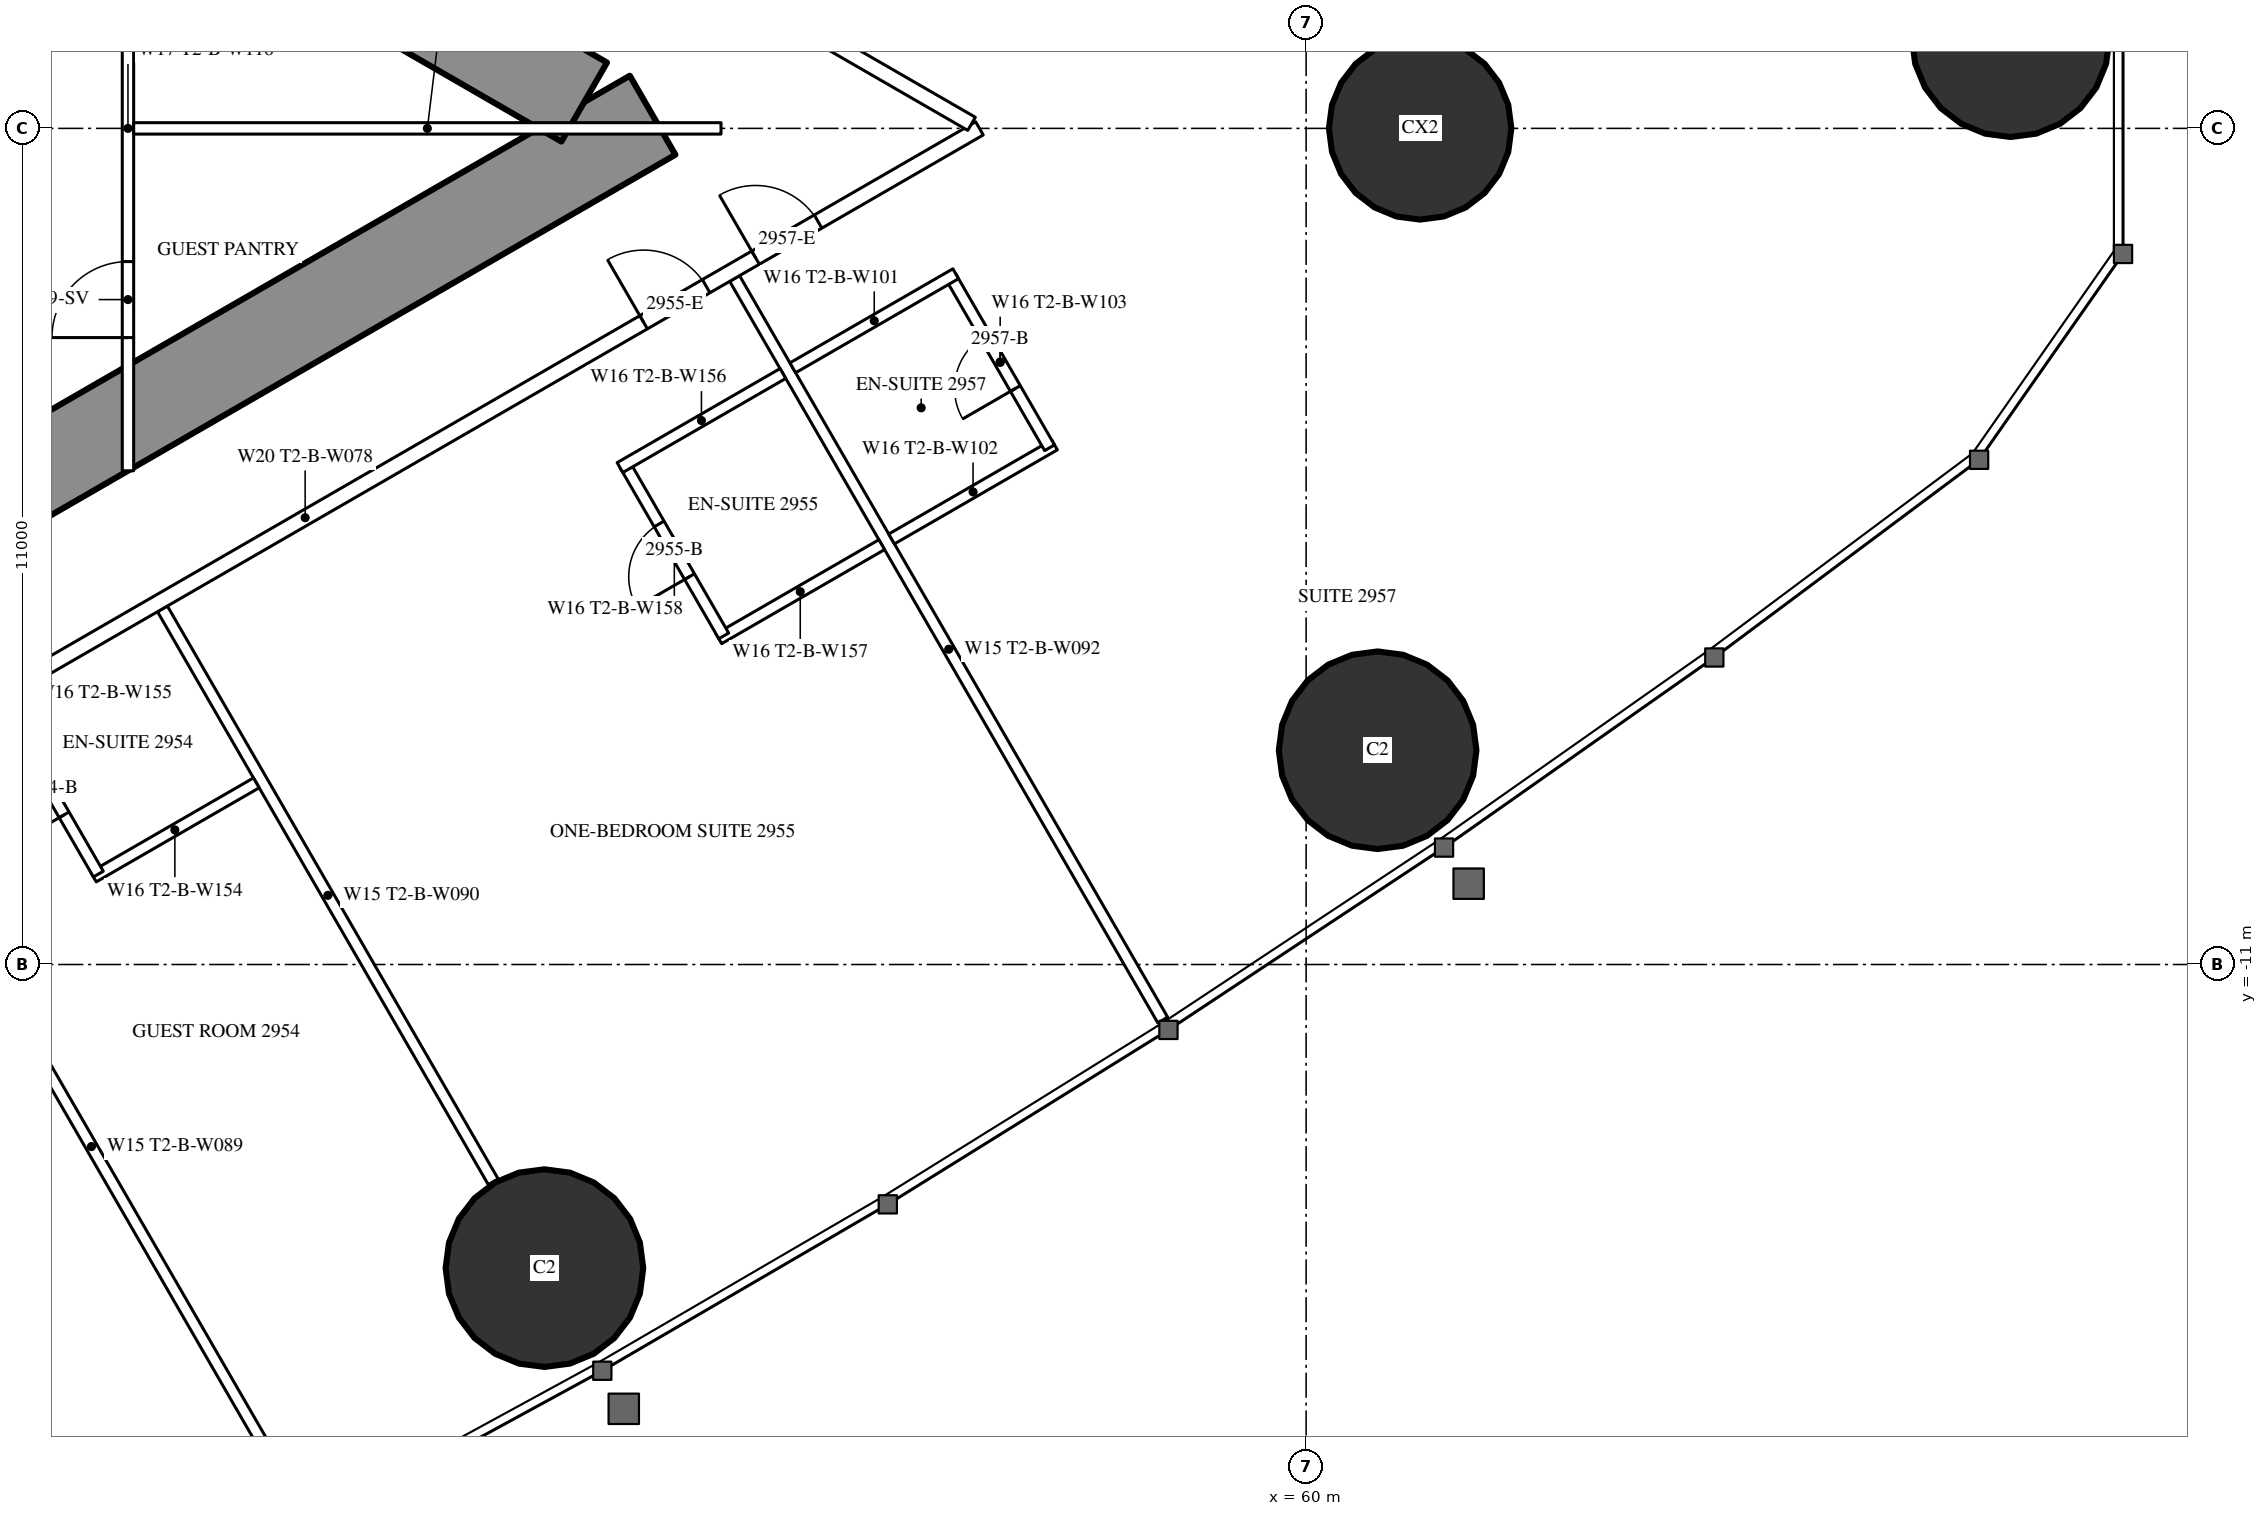
"""IFC4 building model, lengths in metres.
Left out: names, types, materials, properties, quantities, classifications, styles, units other than length and angle.
Written with IfcOpenShell. Run it as: python <this file> out.ifc"""

import sys

from ifc_helpers import new_model, si_unit, direction, frame, frame_2d, origin, origin_2d, place, context, subcontext, project, spatial, rectangle, circle, hollow_circle, extrude, element, fill, save


model = new_model("IFC4")
c1 = context("Model", 3, precision=1e-05, world=origin(), true_north=direction((0.0, 1.0)))
c2 = subcontext(c1, "Body", "Model", "MODEL_VIEW")
j1 = project(units=[si_unit("LENGTHUNIT", "METRE"), si_unit("PLANEANGLEUNIT", "RADIAN")], contexts=[c1])
p1 = place(None, origin())
s1 = spatial("IfcSite", under=j1, at=p1, CompositionType="ELEMENT")
p2 = place(p1, origin())
s2 = spatial("IfcBuilding", under=s1, at=p2, CompositionType="ELEMENT")
p3 = place(p2, frame((0.0, 0.0, 111.6)))
s3 = spatial("IfcBuildingStorey", under=s2, at=p3, CompositionType="ELEMENT", Elevation=111.6)
for number, where, z_axis, x_axis in (
    (1, (69.269, 1.187, 0.0), (0.0, 0.0, 1.0), (1.0, 0.0, 0.0)),
    (2, (49.979, -14.994, 0.0), (0.0, 0.0, 1.0), (1.0, 0.0, 0.0)),
    (3, (60.941, -8.181, 0.0), (0.0, 0.0, 1.0), (1.0, 0.0, 0.0)),
):
    element("IfcColumn", number, at=place(p3, frame(where, z_axis=z_axis, x_axis=x_axis)), inside=s3, PredefinedType="COLUMN", context=c2, shape_type="SweptSolid", body=[
        extrude(hollow_circle(Radius=1.3, WallThickness=0.1, at=origin_2d()), origin(), (0.0, 0.0, 1.0), 3.5),
    ])
p4 = place(p3, frame((61.5, 0.0, 0.0), z_axis=(0.0, 0.0, 1.0), x_axis=(1.0, 0.0, 0.0)))
e4 = element("IfcColumn", 4, at=p4, inside=s3, PredefinedType="COLUMN", context=c2, shape_type="SweptSolid", body=[
    extrude(circle(Radius=1.2, at=origin_2d()), origin(), (0.0, 0.0, 1.0), 3.5),
])
p5 = place(p3, frame((27.2, -13.8, 0.0), z_axis=(0.0, 0.0, 1.0), x_axis=(0.866027159892, 0.499996958321, 0.0)))
e5 = element("IfcWall", 5, at=p5, inside=s3, PredefinedType="SHEAR", context=c2, shape_type="SweptSolid", body=[
    extrude(rectangle(XDim=27.947, YDim=1.2, at=frame_2d((13.973, 0.0))), origin(), (0.0, 0.0, 1.0), 3.5),
])
p6 = place(p5, frame((4.6, 0.0, 0.0)))
e6 = element("IfcOpeningElement", 6, at=p6, cuts=e5, PredefinedType="OPENING", context=c2, shape_type="SweptSolid", body=[
    extrude(rectangle(XDim=1.0, YDim=2.2, at=frame_2d((0.5, 1.1))), frame((0.0, 0.61, 0.0), z_axis=(0.0, -1.0, 0.0), x_axis=(1.0, 0.0, 0.0)), (0.0, 0.0, 1.0), 1.22),
])
p7 = place(p5, frame((13.395, 0.0, 0.0)))
e7 = element("IfcOpeningElement", 7, at=p7, cuts=e5, PredefinedType="OPENING", context=c2, shape_type="SweptSolid", body=[
    extrude(rectangle(XDim=1.8, YDim=2.2, at=frame_2d((0.9, 1.1))), frame((0.0, 0.61, 0.0), z_axis=(0.0, -1.0, 0.0), x_axis=(1.0, 0.0, 0.0)), (0.0, 0.0, 1.0), 1.22),
])
p8 = place(p3, frame((27.2, 13.8, 0.0), z_axis=(0.0, 0.0, 1.0), x_axis=(0.866024515034, -0.500001539357, 0.0)))
e8 = element("IfcWall", 8, at=p8, inside=s3, PredefinedType="SHEAR", context=c2, shape_type="SweptSolid", body=[
    extrude(rectangle(XDim=26.907, YDim=1.2, at=frame_2d((13.454, 0.0))), origin(), (0.0, 0.0, 1.0), 3.5),
])
p9 = place(p8, frame((4.6, 0.0, 0.0)))
e9 = element("IfcOpeningElement", 9, at=p9, cuts=e8, PredefinedType="OPENING", context=c2, shape_type="SweptSolid", body=[
    extrude(rectangle(XDim=1.0, YDim=2.2, at=frame_2d((0.5, 1.1))), frame((0.0, 0.61, 0.0), z_axis=(0.0, -1.0, 0.0), x_axis=(1.0, 0.0, 0.0)), (0.0, 0.0, 1.0), 1.22),
])
p10 = place(p8, frame((13.395, 0.0, 0.0)))
e10 = element("IfcOpeningElement", 10, at=p10, cuts=e8, PredefinedType="OPENING", context=c2, shape_type="SweptSolid", body=[
    extrude(rectangle(XDim=1.8, YDim=2.2, at=frame_2d((0.9, 1.1))), frame((0.0, 0.61, 0.0), z_axis=(0.0, -1.0, 0.0), x_axis=(1.0, 0.0, 0.0)), (0.0, 0.0, 1.0), 1.22),
])
p11 = place(p3, frame((41.19, -8.494, 0.0), z_axis=(0.0, 0.0, 1.0), x_axis=(0.49999258054, -0.866029687369, 0.0)))
e11 = element("IfcWall", 11, at=p11, inside=s3, PredefinedType="PARTITIONING", context=c2, shape_type="SweptSolid", body=[
    extrude(rectangle(XDim=11.318, YDim=0.15, at=frame_2d((5.659, 0.0))), origin(), (0.0, 0.0, 1.0), 3.25),
])
p12 = place(p3, frame((44.954, -6.321, 0.0), z_axis=(0.0, 0.0, 1.0), x_axis=(0.500018676722, -0.866014620505, 0.0)))
e12 = element("IfcWall", 12, at=p12, inside=s3, PredefinedType="PARTITIONING", context=c2, shape_type="SweptSolid", body=[
    extrude(rectangle(XDim=8.704, YDim=0.15, at=frame_2d((4.352, 0.0))), origin(), (0.0, 0.0, 1.0), 2.2),
])
p13 = place(p3, frame((52.481, -1.975, 0.0), z_axis=(0.0, 0.0, 1.0), x_axis=(0.500003867771, -0.866023170714, 0.0)))
e13 = element("IfcWall", 13, at=p13, inside=s3, PredefinedType="PARTITIONING", context=c2, shape_type="SweptSolid", body=[
    extrude(rectangle(XDim=11.265, YDim=0.15, at=frame_2d((5.632, 0.0))), origin(), (0.0, 0.0, 1.0), 3.25),
])
p14 = place(p3, frame((37.96, -10.243, 0.0), z_axis=(0.0, 0.0, 1.0), x_axis=(0.866026429433, 0.499998223521, 0.0)))
e14 = element("IfcWall", 14, at=p14, inside=s3, PredefinedType="PARTITIONING", context=c2, shape_type="SweptSolid", body=[
    extrude(rectangle(XDim=20.487, YDim=0.2, at=frame_2d((10.243, 0.0))), origin(), (0.0, 0.0, 1.0), 3.25),
])
p15 = place(p14, frame((4.343, 0.0, 0.0)))
e15 = element("IfcOpeningElement", 15, at=p15, cuts=e14, PredefinedType="OPENING", context=c2, shape_type="SweptSolid", body=[
    extrude(rectangle(XDim=0.95, YDim=2.2, at=frame_2d((0.475, 1.1))), frame((0.0, 0.11, 0.0), z_axis=(0.0, -1.0, 0.0), x_axis=(1.0, 0.0, 0.0)), (0.0, 0.0, 1.0), 0.22),
])
p16 = place(p14, frame((15.385, 0.0, 0.0)))
e16 = element("IfcOpeningElement", 16, at=p16, cuts=e14, PredefinedType="OPENING", context=c2, shape_type="SweptSolid", body=[
    extrude(rectangle(XDim=0.95, YDim=2.2, at=frame_2d((0.475, 1.1))), frame((0.0, 0.11, 0.0), z_axis=(0.0, -1.0, 0.0), x_axis=(1.0, 0.0, 0.0)), (0.0, 0.0, 1.0), 0.22),
])
p17 = place(p14, frame((17.085, 0.0, 0.0)))
e17 = element("IfcOpeningElement", 17, at=p17, cuts=e14, PredefinedType="OPENING", context=c2, shape_type="SweptSolid", body=[
    extrude(rectangle(XDim=0.95, YDim=2.2, at=frame_2d((0.475, 1.1))), frame((0.0, 0.11, 0.0), z_axis=(0.0, -1.0, 0.0), x_axis=(1.0, 0.0, 0.0)), (0.0, 0.0, 1.0), 0.22),
])
p18 = place(p14, frame((1.048, 0.0, 0.0)))
e18 = element("IfcOpeningElement", 18, at=p18, cuts=e14, PredefinedType="OPENING", context=c2, shape_type="SweptSolid", body=[
    extrude(rectangle(XDim=1.8, YDim=2.2, at=frame_2d((0.9, 1.1))), frame((0.0, 0.11, 0.0), z_axis=(0.0, -1.0, 0.0), x_axis=(1.0, 0.0, 0.0)), (0.0, 0.0, 1.0), 0.22),
])
p19 = place(p3, frame((44.925, 6.222, 0.0), z_axis=(0.0, 0.0, 1.0), x_axis=(0.866025590081, -0.499999677325, 0.0)))
e19 = element("IfcWall", 19, at=p19, inside=s3, PredefinedType="PARTITIONING", context=c2, shape_type="SweptSolid", body=[
    extrude(rectangle(XDim=12.324, YDim=0.2, at=frame_2d((6.162, 0.0))), origin(), (0.0, 0.0, 1.0), 3.25),
])
p20 = place(p19, frame((9.042, 0.0, 0.0)))
e20 = element("IfcOpeningElement", 20, at=p20, cuts=e19, PredefinedType="OPENING", context=c2, shape_type="SweptSolid", body=[
    extrude(rectangle(XDim=0.95, YDim=2.2, at=frame_2d((0.475, 1.1))), frame((0.0, 0.11, 0.0), z_axis=(0.0, -1.0, 0.0), x_axis=(1.0, 0.0, 0.0)), (0.0, 0.0, 1.0), 0.22),
])
p21 = place(p19, frame((7.342, 0.0, 0.0)))
e21 = element("IfcOpeningElement", 21, at=p21, cuts=e19, PredefinedType="OPENING", context=c2, shape_type="SweptSolid", body=[
    extrude(rectangle(XDim=0.95, YDim=2.2, at=frame_2d((0.475, 1.1))), frame((0.0, 0.11, 0.0), z_axis=(0.0, -1.0, 0.0), x_axis=(1.0, 0.0, 0.0)), (0.0, 0.0, 1.0), 0.22),
])
p22 = place(p19, frame((0.6, 0.0, 0.0)))
e22 = element("IfcOpeningElement", 22, at=p22, cuts=e19, PredefinedType="OPENING", context=c2, shape_type="SweptSolid", body=[
    extrude(rectangle(XDim=0.95, YDim=2.2, at=frame_2d((0.475, 1.1))), frame((0.0, 0.11, 0.0), z_axis=(0.0, -1.0, 0.0), x_axis=(1.0, 0.0, 0.0)), (0.0, 0.0, 1.0), 0.22),
])
p23 = place(p3, frame((44.045, -9.848, 0.0), z_axis=(0.0, 0.0, 1.0), x_axis=(0.866031185235, 0.4999899861, 0.0)))
e23 = element("IfcWall", 23, at=p23, inside=s3, PredefinedType="PARTITIONING", context=c2, shape_type="SweptSolid", body=[
    extrude(rectangle(XDim=2.475, YDim=0.15, at=frame_2d((1.238, 0.0))), origin(), (0.0, 0.0, 1.0), 3.25),
])
p24 = place(p3, frame((42.81, -7.559, 0.0), z_axis=(0.0, 0.0, 1.0), x_axis=(0.499936506574, -0.866062058628, 0.0)))
e24 = element("IfcWall", 24, at=p24, inside=s3, PredefinedType="PARTITIONING", context=c2, shape_type="SweptSolid", body=[
    extrude(rectangle(XDim=2.6, YDim=0.15, at=frame_2d((1.3, 0.0))), origin(), (0.0, 0.0, 1.0), 3.25),
])
p25 = place(p24, frame((0.9, 0.0, 0.0)))
e25 = element("IfcOpeningElement", 25, at=p25, cuts=e24, PredefinedType="OPENING", context=c2, shape_type="SweptSolid", body=[
    extrude(rectangle(XDim=0.8, YDim=2.2, at=frame_2d((0.4, 1.1))), frame((0.0, 0.085, 0.0), z_axis=(0.0, -1.0, 0.0), x_axis=(1.0, 0.0, 0.0)), (0.0, 0.0, 1.0), 0.17),
])
p26 = place(p3, frame((52.273, -6.714, 0.0), z_axis=(0.0, 0.0, 1.0), x_axis=(0.866031185235, 0.4999899861, 0.0)))
e26 = element("IfcWall", 26, at=p26, inside=s3, PredefinedType="PARTITIONING", context=c2, shape_type="SweptSolid", body=[
    extrude(rectangle(XDim=2.475, YDim=0.15, at=frame_2d((1.238, 0.0))), origin(), (0.0, 0.0, 1.0), 3.25),
])
p27 = place(p3, frame((51.038, -4.425, 0.0), z_axis=(0.0, 0.0, 1.0), x_axis=(0.49997716683, -0.86603858612, 0.0)))
e27 = element("IfcWall", 27, at=p27, inside=s3, PredefinedType="PARTITIONING", context=c2, shape_type="SweptSolid", body=[
    extrude(rectangle(XDim=2.6, YDim=0.15, at=frame_2d((1.3, 0.0))), origin(), (0.0, 0.0, 1.0), 3.25),
])
p28 = place(p27, frame((0.9, 0.0, 0.0)))
e28 = element("IfcOpeningElement", 28, at=p28, cuts=e27, PredefinedType="OPENING", context=c2, shape_type="SweptSolid", body=[
    extrude(rectangle(XDim=0.8, YDim=2.2, at=frame_2d((0.4, 1.1))), frame((0.0, 0.085, 0.0), z_axis=(0.0, -1.0, 0.0), x_axis=(1.0, 0.0, 0.0)), (0.0, 0.0, 1.0), 0.17),
])
p29 = place(p3, frame((50.973, -4.462, 0.0), z_axis=(0.0, 0.0, 1.0), x_axis=(0.866031185235, 0.4999899861, 0.0)))
e29 = element("IfcWall", 29, at=p29, inside=s3, PredefinedType="PARTITIONING", context=c2, shape_type="SweptSolid", body=[
    extrude(rectangle(XDim=2.475, YDim=0.15, at=frame_2d((1.238, 0.0))), origin(), (0.0, 0.0, 1.0), 3.25),
])
p30 = place(p3, frame((54.546, -5.402, 0.0), z_axis=(0.0, 0.0, 1.0), x_axis=(0.866006523861, 0.500032699561, 0.0)))
e30 = element("IfcWall", 30, at=p30, inside=s3, PredefinedType="PARTITIONING", context=c2, shape_type="SweptSolid", body=[
    extrude(rectangle(XDim=2.475, YDim=0.15, at=frame_2d((1.237, 0.0))), origin(), (0.0, 0.0, 1.0), 3.25),
])
p31 = place(p3, frame((55.325, -1.95, 0.0), z_axis=(0.0, 0.0, 1.0), x_axis=(0.500006934395, -0.866021400173, 0.0)))
e31 = element("IfcWall", 31, at=p31, inside=s3, PredefinedType="PARTITIONING", context=c2, shape_type="SweptSolid", body=[
    extrude(rectangle(XDim=2.6, YDim=0.15, at=frame_2d((1.3, 0.0))), origin(), (0.0, 0.0, 1.0), 3.25),
])
p32 = place(p31, frame((0.9, 0.0, 0.0)))
e32 = element("IfcOpeningElement", 32, at=p32, cuts=e31, PredefinedType="OPENING", context=c2, shape_type="SweptSolid", body=[
    extrude(rectangle(XDim=0.8, YDim=2.2, at=frame_2d((0.4, 1.1))), frame((0.0, 0.085, 0.0), z_axis=(0.0, -1.0, 0.0), x_axis=(1.0, 0.0, 0.0)), (0.0, 0.0, 1.0), 0.17),
])
p33 = place(p3, frame((53.246, -3.15, 0.0), z_axis=(0.0, 0.0, 1.0), x_axis=(0.866006523861, 0.500032699561, 0.0)))
e33 = element("IfcWall", 33, at=p33, inside=s3, PredefinedType="PARTITIONING", context=c2, shape_type="SweptSolid", body=[
    extrude(rectangle(XDim=2.475, YDim=0.15, at=frame_2d((1.237, 0.0))), origin(), (0.0, 0.0, 1.0), 3.25),
])
p34 = place(p3, frame((44.5, -4.505, 0.0), z_axis=(0.0, 0.0, 1.0), x_axis=(0.0, 1.0, 0.0)))
e34 = element("IfcWall", 34, at=p34, inside=s3, PredefinedType="PARTITIONING", context=c2, shape_type="SweptSolid", body=[
    extrude(rectangle(XDim=9.009, YDim=0.15, at=frame_2d((4.505, 0.0))), origin(), (0.0, 0.0, 1.0), 2.45),
])
p35 = place(p34, frame((1.752, 0.0, 0.0)))
e35 = element("IfcOpeningElement", 35, at=p35, cuts=e34, PredefinedType="OPENING", context=c2, shape_type="SweptSolid", body=[
    extrude(rectangle(XDim=1.0, YDim=2.2, at=frame_2d((0.5, 1.1))), frame((0.0, 0.085, 0.0), z_axis=(0.0, -1.0, 0.0), x_axis=(1.0, 0.0, 0.0)), (0.0, 0.0, 1.0), 0.17),
])
p36 = place(p34, frame((6.257, 0.0, 0.0)))
e36 = element("IfcOpeningElement", 36, at=p36, cuts=e34, PredefinedType="OPENING", context=c2, shape_type="SweptSolid", body=[
    extrude(rectangle(XDim=1.0, YDim=2.2, at=frame_2d((0.5, 1.1))), frame((0.0, 0.085, 0.0), z_axis=(0.0, -1.0, 0.0), x_axis=(1.0, 0.0, 0.0)), (0.0, 0.0, 1.0), 0.17),
])
p37 = place(p3, frame((44.575, 0.0, 0.0), z_axis=(0.0, 0.0, 1.0), x_axis=(1.0, 0.0, 0.0)))
e37 = element("IfcWall", 37, at=p37, inside=s3, PredefinedType="PARTITIONING", context=c2, shape_type="SweptSolid", body=[
    extrude(rectangle(XDim=7.727, YDim=0.15, at=frame_2d((3.864, 0.0))), origin(), (0.0, 0.0, 1.0), 2.2),
])
p38 = place(p25, origin())
e38 = element("IfcDoor", 38, at=p38, inside=s3, OperationType="SINGLE_SWING_RIGHT", PredefinedType="DOOR", context=c2, shape_type="SweptSolid", body=[
    extrude(rectangle(XDim=0.8, YDim=2.2, at=frame_2d((0.4, 1.1))), frame((0.0, 0.025, 0.0), z_axis=(0.0, -1.0, 0.0), x_axis=(1.0, 0.0, 0.0)), (0.0, 0.0, 1.0), 0.05),
])
fill(e25, e38)
p39 = place(p28, origin())
e39 = element("IfcDoor", 39, at=p39, inside=s3, OperationType="SINGLE_SWING_RIGHT", PredefinedType="DOOR", context=c2, shape_type="SweptSolid", body=[
    extrude(rectangle(XDim=0.8, YDim=2.2, at=frame_2d((0.4, 1.1))), frame((0.0, 0.025, 0.0), z_axis=(0.0, -1.0, 0.0), x_axis=(1.0, 0.0, 0.0)), (0.0, 0.0, 1.0), 0.05),
])
fill(e28, e39)
p40 = place(p16, origin())
e40 = element("IfcDoor", 40, at=p40, inside=s3, OperationType="SINGLE_SWING_LEFT", PredefinedType="DOOR", context=c2, shape_type="SweptSolid", body=[
    extrude(rectangle(XDim=0.95, YDim=2.2, at=frame_2d((0.475, 1.1))), frame((0.0, 0.025, 0.0), z_axis=(0.0, -1.0, 0.0), x_axis=(1.0, 0.0, 0.0)), (0.0, 0.0, 1.0), 0.05),
])
fill(e16, e40)
p41 = place(p32, origin())
e41 = element("IfcDoor", 41, at=p41, inside=s3, OperationType="SINGLE_SWING_RIGHT", PredefinedType="DOOR", context=c2, shape_type="SweptSolid", body=[
    extrude(rectangle(XDim=0.8, YDim=2.2, at=frame_2d((0.4, 1.1))), frame((0.0, 0.025, 0.0), z_axis=(0.0, -1.0, 0.0), x_axis=(1.0, 0.0, 0.0)), (0.0, 0.0, 1.0), 0.05),
])
fill(e32, e41)
p42 = place(p17, origin())
e42 = element("IfcDoor", 42, at=p42, inside=s3, OperationType="SINGLE_SWING_LEFT", PredefinedType="DOOR", context=c2, shape_type="SweptSolid", body=[
    extrude(rectangle(XDim=0.95, YDim=2.2, at=frame_2d((0.475, 1.1))), frame((0.0, 0.025, 0.0), z_axis=(0.0, -1.0, 0.0), x_axis=(1.0, 0.0, 0.0)), (0.0, 0.0, 1.0), 0.05),
])
fill(e17, e42)
p43 = place(p35, origin())
e43 = element("IfcDoor", 43, at=p43, inside=s3, OperationType="SINGLE_SWING_LEFT", PredefinedType="DOOR", context=c2, shape_type="SweptSolid", body=[
    extrude(rectangle(XDim=1.0, YDim=2.2, at=frame_2d((0.5, 1.1))), frame((0.0, 0.025, 0.0), z_axis=(0.0, -1.0, 0.0), x_axis=(1.0, 0.0, 0.0)), (0.0, 0.0, 1.0), 0.05),
])
fill(e35, e43)
save(model, sys.argv[1])
